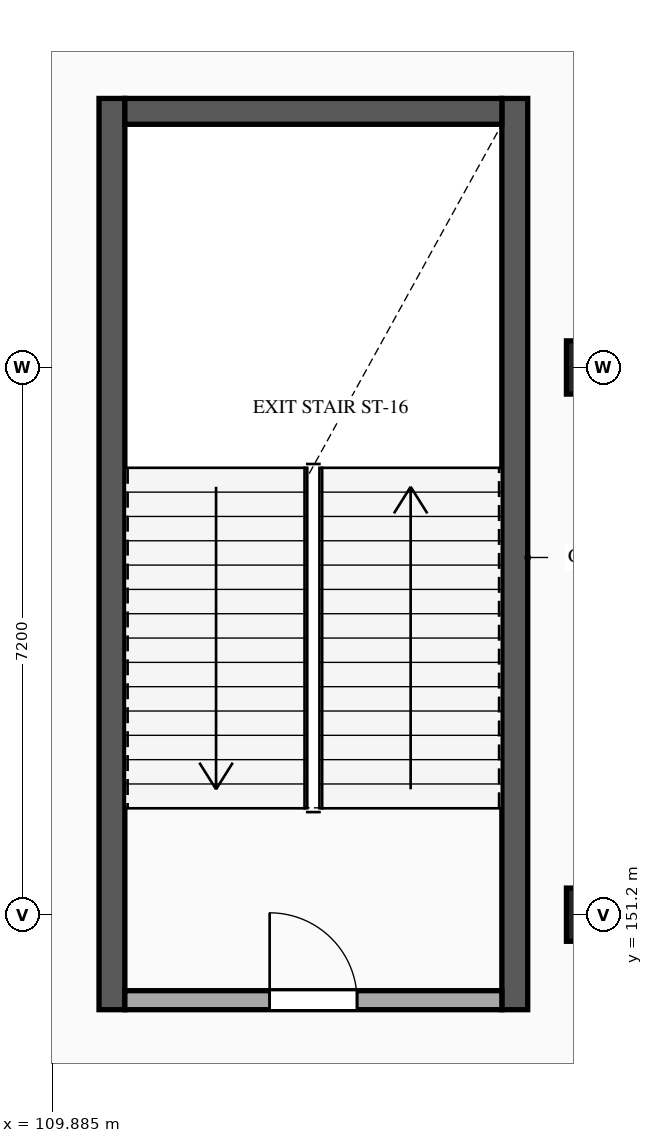
"""IFC4 building model, lengths in metres.
Left out: names, types, materials, properties, quantities, classifications, styles, units other than length and angle.
Written with IfcOpenShell. Run it as: python <this file> out.ifc"""

import sys

from ifc_helpers import new_model, si_unit, direction, frame, frame_2d, origin, origin_2d, place, context, subcontext, project, spatial, rectangle, extrude, element, fill, save


model = new_model("IFC4")
c1 = context("Model", 3, precision=1e-05, world=origin(), true_north=direction((0.0, 1.0)))
c2 = subcontext(c1, "Body", "Model", "MODEL_VIEW")
j1 = project(units=[si_unit("LENGTHUNIT", "METRE"), si_unit("PLANEANGLEUNIT", "RADIAN")], contexts=[c1])
p1 = place(None, origin())
s1 = spatial("IfcSite", under=j1, at=p1, CompositionType="ELEMENT")
p2 = place(p1, origin())
s2 = spatial("IfcBuilding", under=s1, at=p2, CompositionType="ELEMENT")
p3 = place(p2, frame((0.0, 0.0, 10.8)))
s3 = spatial("IfcBuildingStorey", under=s2, at=p3, CompositionType="ELEMENT", Elevation=10.8)
for number, where, z_axis, x_axis in (
    (1, (117.0, 151.2, 0.0), (0.0, 0.0, 1.0), (1.0, 0.0, 0.0)),
    (2, (117.0, 158.4, 0.0), (0.0, 0.0, 1.0), (1.0, 0.0, 0.0)),
):
    element("IfcColumn", number, at=place(p3, frame(where, z_axis=z_axis, x_axis=x_axis)), inside=s3, PredefinedType="COLUMN", context=c2, shape_type="SweptSolid", body=[
        extrude(rectangle(XDim=0.7, YDim=0.7, at=origin_2d()), origin(), (0.0, 0.0, 1.0), 4.5),
    ])
for number, where, z_axis, x_axis in (
    (3, (110.67, 149.95, 0.0), (0.0, 0.0, 1.0), (0.0, 1.0, 0.0)),
    (4, (115.97, 161.94, 0.0), (0.0, 0.0, 1.0), (0.0, -1.0, 0.0)),
):
    element("IfcWall", number, at=place(p3, frame(where, z_axis=z_axis, x_axis=x_axis)), inside=s3, PredefinedType="SHEAR", context=c2, shape_type="SweptSolid", body=[
        extrude(rectangle(XDim=11.99, YDim=0.34, at=frame_2d((5.995, 0.0))), origin(), (0.0, 0.0, 1.0), 4.25),
    ])
p4 = place(p3, frame((110.84, 161.77, 0.0), z_axis=(0.0, 0.0, 1.0), x_axis=(1.0, 0.0, 0.0)))
e5 = element("IfcWall", 5, at=p4, inside=s3, PredefinedType="SHEAR", context=c2, shape_type="SweptSolid", body=[
    extrude(rectangle(XDim=4.96, YDim=0.34, at=frame_2d((2.48, 0.0))), origin(), (0.0, 0.0, 1.0), 4.25),
])
p5 = place(p3, frame((110.84, 150.075, 0.0), z_axis=(0.0, 0.0, 1.0), x_axis=(1.0, 0.0, 0.0)))
e6 = element("IfcWall", 6, at=p5, inside=s3, PredefinedType="STANDARD", context=c2, shape_type="SweptSolid", body=[
    extrude(rectangle(XDim=4.96, YDim=0.25, at=frame_2d((2.48, 0.0))), origin(), (0.0, 0.0, 1.0), 4.22),
])
p6 = place(p5, frame((1.905, 0.0, 0.0)))
e7 = element("IfcOpeningElement", 7, at=p6, cuts=e6, PredefinedType="OPENING", context=c2, shape_type="SweptSolid", body=[
    extrude(rectangle(XDim=1.15, YDim=2.2, at=frame_2d((0.575, 1.1))), frame((0.0, 0.135, 0.0), z_axis=(0.0, -1.0, 0.0), x_axis=(1.0, 0.0, 0.0)), (0.0, 0.0, 1.0), 0.27),
])
p7 = place(p6, origin())
e8 = element("IfcDoor", 8, at=p7, inside=s3, OperationType="SINGLE_SWING_LEFT", PredefinedType="DOOR", context=c2, shape_type="SweptSolid", body=[
    extrude(rectangle(XDim=1.15, YDim=2.2, at=frame_2d((0.575, 1.1))), frame((0.0, 0.025, 0.0), z_axis=(0.0, -1.0, 0.0), x_axis=(1.0, 0.0, 0.0)), (0.0, 0.0, 1.0), 0.05),
])
fill(e7, e8)
save(model, sys.argv[1])
